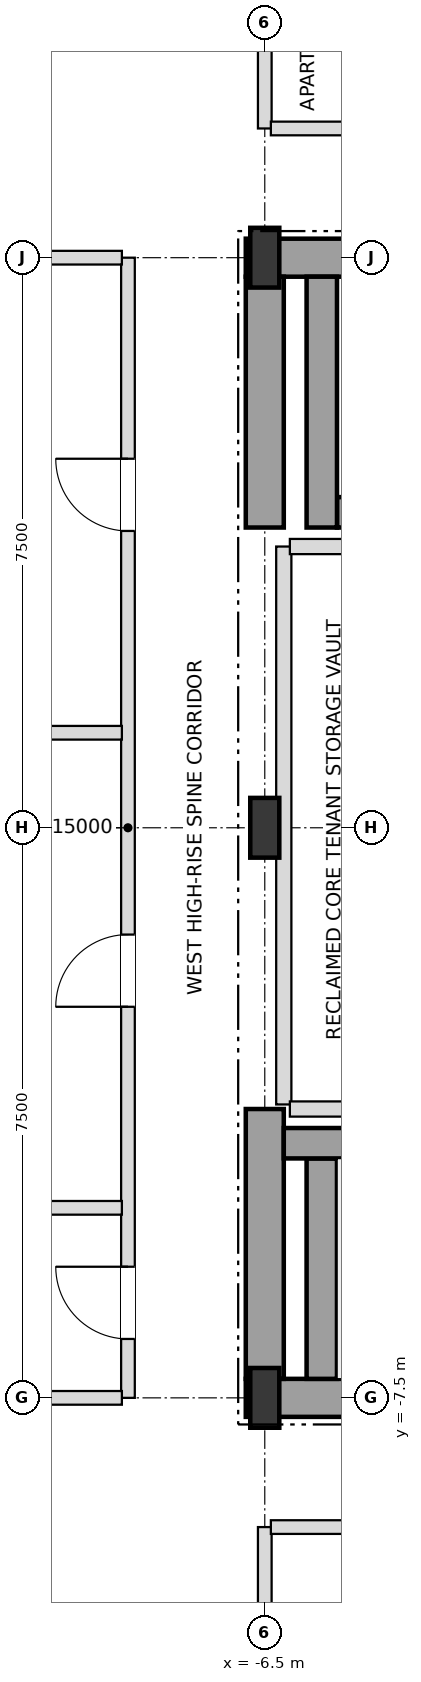
"""IFC4 building model, lengths in metres.
Left out: names, types, materials, properties, quantities, classifications, styles, units other than length and angle.
Written with IfcOpenShell. Run it as: python <this file> out.ifc"""

import sys

from ifc_helpers import new_model, si_unit, direction, frame, frame_2d, origin, origin_2d, place, context, subcontext, project, spatial, rectangle, i_section, extrude, element, fill, save


model = new_model("IFC4")
c1 = context("Model", 3, precision=1e-05, world=origin(), true_north=direction((0.0, 1.0)))
c2 = subcontext(c1, "Body", "Model", "MODEL_VIEW")
j1 = project(units=[si_unit("LENGTHUNIT", "METRE"), si_unit("PLANEANGLEUNIT", "RADIAN")], contexts=[c1])
p1 = place(None, origin())
s1 = spatial("IfcSite", under=j1, at=p1, CompositionType="ELEMENT")
p2 = place(p1, origin())
s2 = spatial("IfcBuilding", under=s1, at=p2, CompositionType="ELEMENT")
p3 = place(p2, frame((0.0, 0.0, 283.5)))
s3 = spatial("IfcBuildingStorey", under=s2, at=p3, CompositionType="ELEMENT", Elevation=283.5)
for number, where, z_axis, x_axis in (
    (1, (-6.5, -7.5, 0.0), (0.0, 0.0, 1.0), (1.0, 0.0, 0.0)),
    (2, (-6.5, 0.0, 0.0), (0.0, 0.0, 1.0), (1.0, 0.0, 0.0)),
    (3, (-6.5, 7.5, 0.0), (0.0, 0.0, 1.0), (1.0, 0.0, 0.0)),
):
    element("IfcColumn", number, at=place(p3, frame(where, z_axis=z_axis, x_axis=x_axis)), inside=s3, PredefinedType="COLUMN", context=c2, shape_type="SweptSolid", body=[
        extrude(i_section(OverallWidth=0.382, OverallDepth=0.786, WebThickness=0.02, FlangeThickness=0.033, at=origin_2d()), origin(), (0.0, 0.0, 1.0), 3.6),
    ])
p4 = place(p3, frame((-6.75, -7.5, 0.0), z_axis=(0.0, 0.0, 1.0), x_axis=(1.0, 0.0, 0.0)))
e4 = element("IfcWall", 4, at=p4, inside=s3, PredefinedType="SHEAR", context=c2, shape_type="SweptSolid", body=[
    extrude(rectangle(XDim=6.75, YDim=0.5, at=frame_2d((3.375, 0.0))), origin(), (0.0, 0.0, 1.0), 3.38),
])
p5 = place(p3, frame((-6.75, 7.5, 0.0), z_axis=(0.0, 0.0, 1.0), x_axis=(1.0, 0.0, 0.0)))
e5 = element("IfcWall", 5, at=p5, inside=s3, PredefinedType="SHEAR", context=c2, shape_type="SweptSolid", body=[
    extrude(rectangle(XDim=6.75, YDim=0.5, at=frame_2d((3.375, 0.0))), origin(), (0.0, 0.0, 1.0), 3.38),
])
p6 = place(p5, frame((1.65, 0.0, 0.0)))
e6 = element("IfcOpeningElement", 6, at=p6, cuts=e5, PredefinedType="OPENING", context=c2, shape_type="SweptSolid", body=[
    extrude(rectangle(XDim=1.05, YDim=2.15, at=frame_2d((0.525, 1.075))), frame((0.0, 0.26, 0.0), z_axis=(0.0, -1.0, 0.0), x_axis=(1.0, 0.0, 0.0)), (0.0, 0.0, 1.0), 0.52),
])
p7 = place(p3, frame((-6.5, -7.25, 0.0), z_axis=(0.0, 0.0, 1.0), x_axis=(0.0, 1.0, 0.0)))
e7 = element("IfcWall", 7, at=p7, inside=s3, PredefinedType="SHEAR", context=c2, shape_type="SweptSolid", body=[
    extrude(rectangle(XDim=3.55, YDim=0.5, at=frame_2d((1.775, 0.0))), origin(), (0.0, 0.0, 1.0), 3.38),
])
p8 = place(p3, frame((-6.5, 3.95, 0.0), z_axis=(0.0, 0.0, 1.0), x_axis=(0.0, 1.0, 0.0)))
e8 = element("IfcWall", 8, at=p8, inside=s3, PredefinedType="SHEAR", context=c2, shape_type="SweptSolid", body=[
    extrude(rectangle(XDim=3.3, YDim=0.5, at=frame_2d((1.65, 0.0))), origin(), (0.0, 0.0, 1.0), 3.38),
])
p9 = place(p3, frame((-5.75, -7.25, 0.0), z_axis=(0.0, 0.0, 1.0), x_axis=(0.0, 1.0, 0.0)))
e9 = element("IfcWall", 9, at=p9, inside=s3, PredefinedType="SHEAR", context=c2, shape_type="SweptSolid", body=[
    extrude(rectangle(XDim=2.9, YDim=0.4, at=frame_2d((1.45, 0.0))), origin(), (0.0, 0.0, 1.0), 3.38),
])
p10 = place(p3, frame((-6.25, -4.15, 0.0), z_axis=(0.0, 0.0, 1.0), x_axis=(1.0, 0.0, 0.0)))
e10 = element("IfcWall", 10, at=p10, inside=s3, PredefinedType="SHEAR", context=c2, shape_type="SweptSolid", body=[
    extrude(rectangle(XDim=7.78, YDim=0.4, at=frame_2d((3.89, 0.0))), origin(), (0.0, 0.0, 1.0), 3.38),
])
p11 = place(p3, frame((-5.55, 4.15, 0.0), z_axis=(0.0, 0.0, 1.0), x_axis=(1.0, 0.0, 0.0)))
e11 = element("IfcWall", 11, at=p11, inside=s3, PredefinedType="SHEAR", context=c2, shape_type="SweptSolid", body=[
    extrude(rectangle(XDim=7.08, YDim=0.4, at=frame_2d((3.54, 0.0))), origin(), (0.0, 0.0, 1.0), 3.38),
])
p12 = place(p3, frame((-5.75, 3.95, 0.0), z_axis=(0.0, 0.0, 1.0), x_axis=(0.0, 1.0, 0.0)))
e12 = element("IfcWall", 12, at=p12, inside=s3, PredefinedType="SHEAR", context=c2, shape_type="SweptSolid", body=[
    extrude(rectangle(XDim=3.3, YDim=0.4, at=frame_2d((1.65, 0.0))), origin(), (0.0, 0.0, 1.0), 3.38),
])
p13 = place(p3, frame((-8.3, -7.5, 0.0), z_axis=(0.0, 0.0, 1.0), x_axis=(0.0, 1.0, 0.0)))
e13 = element("IfcWall", 13, at=p13, inside=s3, PredefinedType="PARTITIONING", context=c2, shape_type="SweptSolid", body=[
    extrude(rectangle(XDim=15.0, YDim=0.18, at=frame_2d((7.5, 0.0))), origin(), (0.0, 0.0, 1.0), 3.38),
])
p14 = place(p13, frame((0.775, 0.0, 0.0)))
e14 = element("IfcOpeningElement", 14, at=p14, cuts=e13, PredefinedType="OPENING", context=c2, shape_type="SweptSolid", body=[
    extrude(rectangle(XDim=0.95, YDim=2.15, at=frame_2d((0.475, 1.075))), frame((0.0, 0.1, 0.0), z_axis=(0.0, -1.0, 0.0), x_axis=(1.0, 0.0, 0.0)), (0.0, 0.0, 1.0), 0.2),
])
p15 = place(p13, frame((5.145, 0.0, 0.0)))
e15 = element("IfcOpeningElement", 15, at=p15, cuts=e13, PredefinedType="OPENING", context=c2, shape_type="SweptSolid", body=[
    extrude(rectangle(XDim=0.95, YDim=2.15, at=frame_2d((0.475, 1.075))), frame((0.0, 0.1, 0.0), z_axis=(0.0, -1.0, 0.0), x_axis=(1.0, 0.0, 0.0)), (0.0, 0.0, 1.0), 0.2),
])
p16 = place(p13, frame((11.405, 0.0, 0.0)))
e16 = element("IfcOpeningElement", 16, at=p16, cuts=e13, PredefinedType="OPENING", context=c2, shape_type="SweptSolid", body=[
    extrude(rectangle(XDim=0.95, YDim=2.15, at=frame_2d((0.475, 1.075))), frame((0.0, 0.1, 0.0), z_axis=(0.0, -1.0, 0.0), x_axis=(1.0, 0.0, 0.0)), (0.0, 0.0, 1.0), 0.2),
])
for number, where, z_axis, x_axis in (
    (17, (-6.5, -19.9, 0.0), (0.0, 0.0, 1.0), (0.0, 1.0, 0.0)),
    (18, (-6.5, 9.2, 0.0), (0.0, 0.0, 1.0), (0.0, 1.0, 0.0)),
):
    element("IfcWall", number, at=place(p3, frame(where, z_axis=z_axis, x_axis=x_axis)), inside=s3, PredefinedType="PARTITIONING", context=c2, shape_type="SweptSolid", body=[
        extrude(rectangle(XDim=10.7, YDim=0.18, at=frame_2d((5.35, 0.0))), origin(), (0.0, 0.0, 1.0), 2.826),
    ])
p17 = place(p3, frame((-6.25, -3.64, 0.0), z_axis=(0.0, 0.0, 1.0), x_axis=(0.0, 1.0, 0.0)))
e19 = element("IfcWall", 19, at=p17, inside=s3, PredefinedType="SOLIDWALL", context=c2, shape_type="SweptSolid", body=[
    extrude(rectangle(XDim=7.34, YDim=0.2, at=frame_2d((3.67, 0.0))), origin(), (0.0, 0.0, 1.0), 3.38),
])
p18 = place(p3, frame((-6.42, -9.2, 0.0), z_axis=(0.0, 0.0, 1.0), x_axis=(1.0, 0.0, 0.0)))
e20 = element("IfcWall", 20, at=p18, inside=s3, PredefinedType="PARTITIONING", context=c2, shape_type="SweptSolid", body=[
    extrude(rectangle(XDim=5.94, YDim=0.18, at=frame_2d((2.97, 0.0))), origin(), (0.0, 0.0, 1.0), 3.38),
])
p19 = place(p18, frame((2.485, 0.0, 0.0)))
e21 = element("IfcOpeningElement", 21, at=p19, cuts=e20, PredefinedType="OPENING", context=c2, shape_type="SweptSolid", body=[
    extrude(rectangle(XDim=0.95, YDim=2.15, at=frame_2d((0.475, 1.075))), frame((0.0, 0.1, 0.0), z_axis=(0.0, -1.0, 0.0), x_axis=(1.0, 0.0, 0.0)), (0.0, 0.0, 1.0), 0.2),
])
p20 = place(p3, frame((-16.9, -7.5, 0.0), z_axis=(0.0, 0.0, 1.0), x_axis=(1.0, 0.0, 0.0)))
e22 = element("IfcWall", 22, at=p20, inside=s3, PredefinedType="PARTITIONING", context=c2, shape_type="SweptSolid", body=[
    extrude(rectangle(XDim=8.52, YDim=0.18, at=frame_2d((4.26, 0.0))), origin(), (0.0, 0.0, 1.0), 2.826),
])
p21 = place(p3, frame((-16.82, -5.0, 0.0), z_axis=(0.0, 0.0, 1.0), x_axis=(1.0, 0.0, 0.0)))
e23 = element("IfcWall", 23, at=p21, inside=s3, PredefinedType="PARTITIONING", context=c2, shape_type="SweptSolid", body=[
    extrude(rectangle(XDim=8.44, YDim=0.18, at=frame_2d((4.22, 0.0))), origin(), (0.0, 0.0, 1.0), 3.018),
])
p22 = place(p3, frame((-6.17, -3.7, 0.0), z_axis=(0.0, 0.0, 1.0), x_axis=(1.0, 0.0, 0.0)))
e24 = element("IfcWall", 24, at=p22, inside=s3, PredefinedType="SOLIDWALL", context=c2, shape_type="SweptSolid", body=[
    extrude(rectangle(XDim=1.94, YDim=0.2, at=frame_2d((0.97, 0.0))), origin(), (0.0, 0.0, 1.0), 3.38),
])
p23 = place(p3, frame((-16.82, 1.25, 0.0), z_axis=(0.0, 0.0, 1.0), x_axis=(1.0, 0.0, 0.0)))
e25 = element("IfcWall", 25, at=p23, inside=s3, PredefinedType="PARTITIONING", context=c2, shape_type="SweptSolid", body=[
    extrude(rectangle(XDim=8.44, YDim=0.18, at=frame_2d((4.22, 0.0))), origin(), (0.0, 0.0, 1.0), 3.018),
])
p24 = place(p3, frame((-6.17, 3.7, 0.0), z_axis=(0.0, 0.0, 1.0), x_axis=(1.0, 0.0, 0.0)))
e26 = element("IfcWall", 26, at=p24, inside=s3, PredefinedType="SOLIDWALL", context=c2, shape_type="SweptSolid", body=[
    extrude(rectangle(XDim=1.94, YDim=0.2, at=frame_2d((0.97, 0.0))), origin(), (0.0, 0.0, 1.0), 3.38),
])
p25 = place(p3, frame((-16.9, 7.5, 0.0), z_axis=(0.0, 0.0, 1.0), x_axis=(1.0, 0.0, 0.0)))
e27 = element("IfcWall", 27, at=p25, inside=s3, PredefinedType="PARTITIONING", context=c2, shape_type="SweptSolid", body=[
    extrude(rectangle(XDim=8.52, YDim=0.18, at=frame_2d((4.26, 0.0))), origin(), (0.0, 0.0, 1.0), 2.826),
])
p26 = place(p3, frame((-6.42, 9.2, 0.0), z_axis=(0.0, 0.0, 1.0), x_axis=(1.0, 0.0, 0.0)))
e28 = element("IfcWall", 28, at=p26, inside=s3, PredefinedType="PARTITIONING", context=c2, shape_type="SweptSolid", body=[
    extrude(rectangle(XDim=1.79, YDim=0.18, at=frame_2d((0.895, 0.0))), origin(), (0.0, 0.0, 1.0), 3.38),
])
p27 = place(p14, origin())
e29 = element("IfcDoor", 29, at=p27, inside=s3, OperationType="SINGLE_SWING_RIGHT", PredefinedType="DOOR", context=c2, shape_type="SweptSolid", body=[
    extrude(rectangle(XDim=0.95, YDim=2.15, at=frame_2d((0.475, 1.075))), frame((0.0, 0.025, 0.0), z_axis=(0.0, -1.0, 0.0), x_axis=(1.0, 0.0, 0.0)), (0.0, 0.0, 1.0), 0.05),
])
fill(e14, e29)
p28 = place(p15, origin())
e30 = element("IfcDoor", 30, at=p28, inside=s3, OperationType="SINGLE_SWING_LEFT", PredefinedType="DOOR", context=c2, shape_type="SweptSolid", body=[
    extrude(rectangle(XDim=0.95, YDim=2.15, at=frame_2d((0.475, 1.075))), frame((0.0, 0.025, 0.0), z_axis=(0.0, -1.0, 0.0), x_axis=(1.0, 0.0, 0.0)), (0.0, 0.0, 1.0), 0.05),
])
fill(e15, e30)
p29 = place(p16, origin())
e31 = element("IfcDoor", 31, at=p29, inside=s3, OperationType="SINGLE_SWING_RIGHT", PredefinedType="DOOR", context=c2, shape_type="SweptSolid", body=[
    extrude(rectangle(XDim=0.95, YDim=2.15, at=frame_2d((0.475, 1.075))), frame((0.0, 0.025, 0.0), z_axis=(0.0, -1.0, 0.0), x_axis=(1.0, 0.0, 0.0)), (0.0, 0.0, 1.0), 0.05),
])
fill(e16, e31)
save(model, sys.argv[1])
